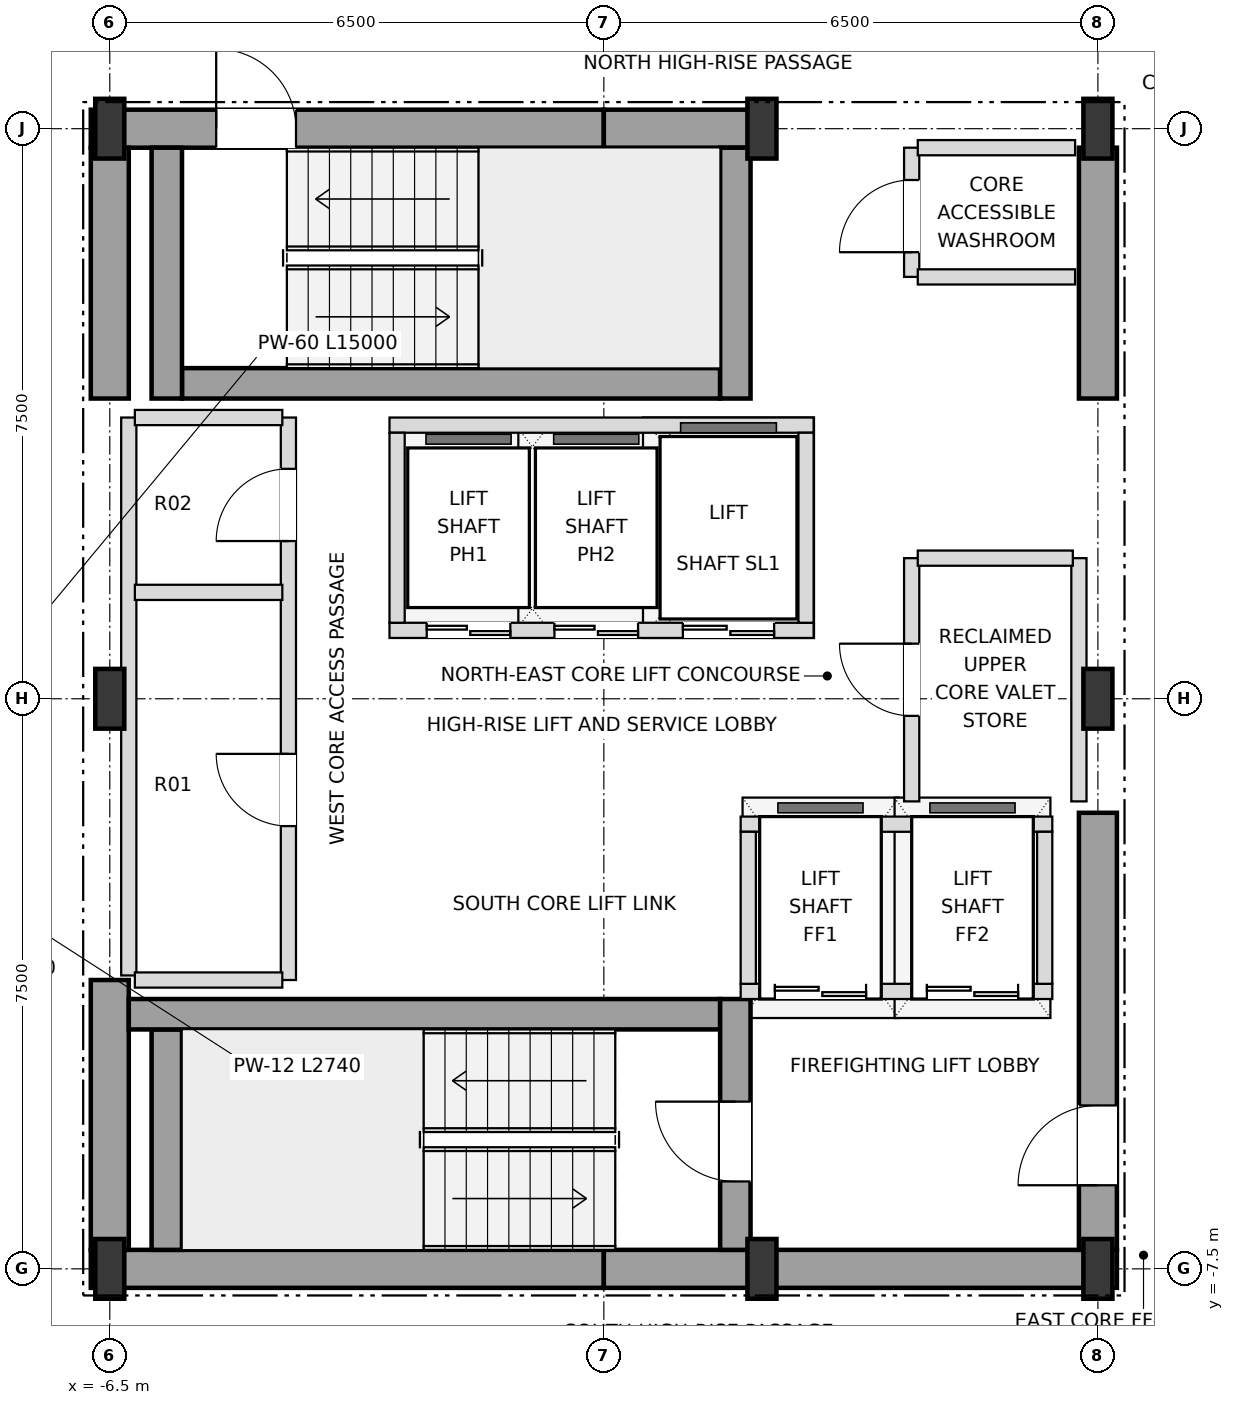
"""IFC4 building model, lengths in metres.
Left out: names, types, materials, properties, quantities, classifications, styles, units other than length and angle.
Written with IfcOpenShell. Run it as: python <this file> out.ifc"""

import sys

from ifc_helpers import new_model, si_unit, direction, frame, frame_2d, origin, origin_2d, place, context, subcontext, project, spatial, rectangle, i_section, extrude, element, fill, save


model = new_model("IFC4")
c1 = context("Model", 3, precision=1e-05, world=origin(), true_north=direction((0.0, 1.0)))
c2 = subcontext(c1, "Body", "Model", "MODEL_VIEW")
j1 = project(units=[si_unit("LENGTHUNIT", "METRE"), si_unit("PLANEANGLEUNIT", "RADIAN")], contexts=[c1])
p1 = place(None, origin())
s1 = spatial("IfcSite", under=j1, at=p1, CompositionType="ELEMENT")
p2 = place(p1, origin())
s2 = spatial("IfcBuilding", under=s1, at=p2, CompositionType="ELEMENT")
p3 = place(p2, frame((0.0, 0.0, 294.3)))
s3 = spatial("IfcBuildingStorey", under=s2, at=p3, CompositionType="ELEMENT", Elevation=294.3)
for number, where, z_axis, x_axis in (
    (1, (-6.5, -7.5, 0.0), (0.0, 0.0, 1.0), (1.0, 0.0, 0.0)),
    (2, (2.08, -7.5, 0.0), (0.0, 0.0, 1.0), (1.0, 0.0, 0.0)),
    (3, (6.5, -7.5, 0.0), (0.0, 0.0, 1.0), (1.0, 0.0, 0.0)),
    (4, (-6.5, 0.0, 0.0), (0.0, 0.0, 1.0), (1.0, 0.0, 0.0)),
    (5, (6.5, 0.0, 0.0), (0.0, 0.0, 1.0), (1.0, 0.0, 0.0)),
    (6, (-6.5, 7.5, 0.0), (0.0, 0.0, 1.0), (1.0, 0.0, 0.0)),
    (7, (2.08, 7.5, 0.0), (0.0, 0.0, 1.0), (1.0, 0.0, 0.0)),
    (8, (6.5, 7.5, 0.0), (0.0, 0.0, 1.0), (1.0, 0.0, 0.0)),
):
    element("IfcColumn", number, at=place(p3, frame(where, z_axis=z_axis, x_axis=x_axis)), inside=s3, PredefinedType="COLUMN", context=c2, shape_type="SweptSolid", body=[
        extrude(i_section(OverallWidth=0.382, OverallDepth=0.786, WebThickness=0.02, FlangeThickness=0.033, at=origin_2d()), origin(), (0.0, 0.0, 1.0), 3.6),
    ])
for number, where, z_axis, x_axis in (
    (9, (-6.75, -7.5, 0.0), (0.0, 0.0, 1.0), (1.0, 0.0, 0.0)),
    (10, (0.0, -7.5, 0.0), (0.0, 0.0, 1.0), (1.0, 0.0, 0.0)),
):
    element("IfcWall", number, at=place(p3, frame(where, z_axis=z_axis, x_axis=x_axis)), inside=s3, PredefinedType="SHEAR", context=c2, shape_type="SweptSolid", body=[
        extrude(rectangle(XDim=6.75, YDim=0.5, at=frame_2d((3.375, 0.0))), origin(), (0.0, 0.0, 1.0), 3.38),
    ])
p4 = place(p3, frame((-6.75, 7.5, 0.0), z_axis=(0.0, 0.0, 1.0), x_axis=(1.0, 0.0, 0.0)))
e11 = element("IfcWall", 11, at=p4, inside=s3, PredefinedType="SHEAR", context=c2, shape_type="SweptSolid", body=[
    extrude(rectangle(XDim=6.75, YDim=0.5, at=frame_2d((3.375, 0.0))), origin(), (0.0, 0.0, 1.0), 3.38),
])
p5 = place(p4, frame((1.65, 0.0, 0.0)))
e12 = element("IfcOpeningElement", 12, at=p5, cuts=e11, PredefinedType="OPENING", context=c2, shape_type="SweptSolid", body=[
    extrude(rectangle(XDim=1.05, YDim=2.15, at=frame_2d((0.525, 1.075))), frame((0.0, 0.26, 0.0), z_axis=(0.0, -1.0, 0.0), x_axis=(1.0, 0.0, 0.0)), (0.0, 0.0, 1.0), 0.52),
])
p6 = place(p3, frame((0.0, 7.5, 0.0), z_axis=(0.0, 0.0, 1.0), x_axis=(1.0, 0.0, 0.0)))
e13 = element("IfcWall", 13, at=p6, inside=s3, PredefinedType="SHEAR", context=c2, shape_type="SweptSolid", body=[
    extrude(rectangle(XDim=2.08, YDim=0.5, at=frame_2d((1.04, 0.0))), origin(), (0.0, 0.0, 1.0), 3.38),
])
p7 = place(p3, frame((-6.5, -7.25, 0.0), z_axis=(0.0, 0.0, 1.0), x_axis=(0.0, 1.0, 0.0)))
e14 = element("IfcWall", 14, at=p7, inside=s3, PredefinedType="SHEAR", context=c2, shape_type="SweptSolid", body=[
    extrude(rectangle(XDim=3.55, YDim=0.5, at=frame_2d((1.775, 0.0))), origin(), (0.0, 0.0, 1.0), 3.38),
])
p8 = place(p3, frame((-6.5, 3.95, 0.0), z_axis=(0.0, 0.0, 1.0), x_axis=(0.0, 1.0, 0.0)))
e15 = element("IfcWall", 15, at=p8, inside=s3, PredefinedType="SHEAR", context=c2, shape_type="SweptSolid", body=[
    extrude(rectangle(XDim=3.3, YDim=0.5, at=frame_2d((1.65, 0.0))), origin(), (0.0, 0.0, 1.0), 3.38),
])
p9 = place(p3, frame((6.5, -7.25, 0.0), z_axis=(0.0, 0.0, 1.0), x_axis=(0.0, 1.0, 0.0)))
e16 = element("IfcWall", 16, at=p9, inside=s3, PredefinedType="SHEAR", context=c2, shape_type="SweptSolid", body=[
    extrude(rectangle(XDim=5.75, YDim=0.5, at=frame_2d((2.875, 0.0))), origin(), (0.0, 0.0, 1.0), 3.38),
])
p10 = place(p9, frame((0.85, 0.0, 0.0)))
e17 = element("IfcOpeningElement", 17, at=p10, cuts=e16, PredefinedType="OPENING", context=c2, shape_type="SweptSolid", body=[
    extrude(rectangle(XDim=1.05, YDim=2.15, at=frame_2d((0.525, 1.075))), frame((0.0, 0.26, 0.0), z_axis=(0.0, -1.0, 0.0), x_axis=(1.0, 0.0, 0.0)), (0.0, 0.0, 1.0), 0.52),
])
p11 = place(p3, frame((6.5, 3.95, 0.0), z_axis=(0.0, 0.0, 1.0), x_axis=(0.0, 1.0, 0.0)))
e18 = element("IfcWall", 18, at=p11, inside=s3, PredefinedType="SHEAR", context=c2, shape_type="SweptSolid", body=[
    extrude(rectangle(XDim=3.3, YDim=0.5, at=frame_2d((1.65, 0.0))), origin(), (0.0, 0.0, 1.0), 3.38),
])
p12 = place(p3, frame((-5.75, -7.25, 0.0), z_axis=(0.0, 0.0, 1.0), x_axis=(0.0, 1.0, 0.0)))
e19 = element("IfcWall", 19, at=p12, inside=s3, PredefinedType="SHEAR", context=c2, shape_type="SweptSolid", body=[
    extrude(rectangle(XDim=2.9, YDim=0.4, at=frame_2d((1.45, 0.0))), origin(), (0.0, 0.0, 1.0), 3.38),
])
p13 = place(p3, frame((-6.25, -4.15, 0.0), z_axis=(0.0, 0.0, 1.0), x_axis=(1.0, 0.0, 0.0)))
e20 = element("IfcWall", 20, at=p13, inside=s3, PredefinedType="SHEAR", context=c2, shape_type="SweptSolid", body=[
    extrude(rectangle(XDim=7.78, YDim=0.4, at=frame_2d((3.89, 0.0))), origin(), (0.0, 0.0, 1.0), 3.38),
])
p14 = place(p3, frame((1.73, -7.25, 0.0), z_axis=(0.0, 0.0, 1.0), x_axis=(0.0, 1.0, 0.0)))
e21 = element("IfcWall", 21, at=p14, inside=s3, PredefinedType="SHEAR", context=c2, shape_type="SweptSolid", body=[
    extrude(rectangle(XDim=3.3, YDim=0.4, at=frame_2d((1.65, 0.0))), origin(), (0.0, 0.0, 1.0), 3.38),
])
p15 = place(p14, frame((0.9, 0.0, 0.0)))
e22 = element("IfcOpeningElement", 22, at=p15, cuts=e21, PredefinedType="OPENING", context=c2, shape_type="SweptSolid", body=[
    extrude(rectangle(XDim=1.05, YDim=2.15, at=frame_2d((0.525, 1.075))), frame((0.0, 0.21, 0.0), z_axis=(0.0, -1.0, 0.0), x_axis=(1.0, 0.0, 0.0)), (0.0, 0.0, 1.0), 0.42),
])
p16 = place(p3, frame((-5.55, 4.15, 0.0), z_axis=(0.0, 0.0, 1.0), x_axis=(1.0, 0.0, 0.0)))
e23 = element("IfcWall", 23, at=p16, inside=s3, PredefinedType="SHEAR", context=c2, shape_type="SweptSolid", body=[
    extrude(rectangle(XDim=7.08, YDim=0.4, at=frame_2d((3.54, 0.0))), origin(), (0.0, 0.0, 1.0), 3.38),
])
for number, where, z_axis, x_axis in (
    (24, (1.73, 3.95, 0.0), (0.0, 0.0, 1.0), (0.0, 1.0, 0.0)),
    (25, (-5.75, 3.95, 0.0), (0.0, 0.0, 1.0), (0.0, 1.0, 0.0)),
):
    element("IfcWall", number, at=place(p3, frame(where, z_axis=z_axis, x_axis=x_axis)), inside=s3, PredefinedType="SHEAR", context=c2, shape_type="SweptSolid", body=[
        extrude(rectangle(XDim=3.3, YDim=0.4, at=frame_2d((1.65, 0.0))), origin(), (0.0, 0.0, 1.0), 3.38),
    ])
p17 = place(p3, frame((-2.82, 0.9, 0.0), z_axis=(0.0, 0.0, 1.0), x_axis=(1.0, 0.0, 0.0)))
e26 = element("IfcWall", 26, at=p17, inside=s3, PredefinedType="SOLIDWALL", context=c2, shape_type="SweptSolid", body=[
    extrude(rectangle(XDim=5.58, YDim=0.2, at=frame_2d((2.79, 0.0))), origin(), (0.0, 0.0, 1.0), 3.38),
])
p18 = place(p17, frame((0.49, 0.0, 0.0)))
e27 = element("IfcOpeningElement", 27, at=p18, cuts=e26, PredefinedType="OPENING", context=c2, shape_type="SweptSolid", body=[
    extrude(rectangle(XDim=1.1, YDim=2.15, at=frame_2d((0.55, 1.075))), frame((0.0, 0.11, 0.0), z_axis=(0.0, -1.0, 0.0), x_axis=(1.0, 0.0, 0.0)), (0.0, 0.0, 1.0), 0.22),
])
p19 = place(p17, frame((2.17, 0.0, 0.0)))
e28 = element("IfcOpeningElement", 28, at=p19, cuts=e26, PredefinedType="OPENING", context=c2, shape_type="SweptSolid", body=[
    extrude(rectangle(XDim=1.1, YDim=2.15, at=frame_2d((0.55, 1.075))), frame((0.0, 0.11, 0.0), z_axis=(0.0, -1.0, 0.0), x_axis=(1.0, 0.0, 0.0)), (0.0, 0.0, 1.0), 0.22),
])
p20 = place(p17, frame((3.86, 0.0, 0.0)))
e29 = element("IfcOpeningElement", 29, at=p20, cuts=e26, PredefinedType="OPENING", context=c2, shape_type="SweptSolid", body=[
    extrude(rectangle(XDim=1.2, YDim=2.2, at=frame_2d((0.6, 1.1))), frame((0.0, 0.11, 0.0), z_axis=(0.0, -1.0, 0.0), x_axis=(1.0, 0.0, 0.0)), (0.0, 0.0, 1.0), 0.22),
])
p21 = place(p3, frame((-2.82, 3.6, 0.0), z_axis=(0.0, 0.0, 1.0), x_axis=(1.0, 0.0, 0.0)))
e30 = element("IfcWall", 30, at=p21, inside=s3, PredefinedType="SOLIDWALL", context=c2, shape_type="SweptSolid", body=[
    extrude(rectangle(XDim=5.58, YDim=0.2, at=frame_2d((2.79, 0.0))), origin(), (0.0, 0.0, 1.0), 3.38),
])
for number, where, z_axis, x_axis in (
    (31, (-2.72, 1.0, 0.0), (0.0, 0.0, 1.0), (0.0, 1.0, 0.0)),
    (32, (2.66, 1.0, 0.0), (0.0, 0.0, 1.0), (0.0, 1.0, 0.0)),
):
    element("IfcWall", number, at=place(p3, frame(where, z_axis=z_axis, x_axis=x_axis)), inside=s3, PredefinedType="SOLIDWALL", context=c2, shape_type="SweptSolid", body=[
        extrude(rectangle(XDim=2.5, YDim=0.2, at=frame_2d((1.25, 0.0))), origin(), (0.0, 0.0, 1.0), 3.38),
    ])
p22 = place(p3, frame((1.8, -3.85, 0.0), z_axis=(0.0, 0.0, 1.0), x_axis=(1.0, 0.0, 0.0)))
e33 = element("IfcWall", 33, at=p22, inside=s3, PredefinedType="SOLIDWALL", context=c2, shape_type="SweptSolid", body=[
    extrude(rectangle(XDim=4.1, YDim=0.2, at=frame_2d((2.05, 0.0))), origin(), (0.0, 0.0, 1.0), 3.38),
])
p23 = place(p22, frame((0.45, 0.0, 0.0)))
e34 = element("IfcOpeningElement", 34, at=p23, cuts=e33, PredefinedType="OPENING", context=c2, shape_type="SweptSolid", body=[
    extrude(rectangle(XDim=1.2, YDim=2.2, at=frame_2d((0.6, 1.1))), frame((0.0, 0.11, 0.0), z_axis=(0.0, -1.0, 0.0), x_axis=(1.0, 0.0, 0.0)), (0.0, 0.0, 1.0), 0.22),
])
p24 = place(p22, frame((2.45, 0.0, 0.0)))
e35 = element("IfcOpeningElement", 35, at=p24, cuts=e33, PredefinedType="OPENING", context=c2, shape_type="SweptSolid", body=[
    extrude(rectangle(XDim=1.2, YDim=2.2, at=frame_2d((0.6, 1.1))), frame((0.0, 0.11, 0.0), z_axis=(0.0, -1.0, 0.0), x_axis=(1.0, 0.0, 0.0)), (0.0, 0.0, 1.0), 0.22),
])
p25 = place(p3, frame((1.8, -1.65, 0.0), z_axis=(0.0, 0.0, 1.0), x_axis=(1.0, 0.0, 0.0)))
e36 = element("IfcWall", 36, at=p25, inside=s3, PredefinedType="SOLIDWALL", context=c2, shape_type="SweptSolid", body=[
    extrude(rectangle(XDim=4.1, YDim=0.2, at=frame_2d((2.05, 0.0))), origin(), (0.0, 0.0, 1.0), 3.38),
])
for number, where, z_axis, x_axis in (
    (37, (1.9, -3.75, 0.0), (0.0, 0.0, 1.0), (0.0, 1.0, 0.0)),
    (38, (5.8, -3.75, 0.0), (0.0, 0.0, 1.0), (0.0, 1.0, 0.0)),
):
    element("IfcWall", number, at=place(p3, frame(where, z_axis=z_axis, x_axis=x_axis)), inside=s3, PredefinedType="SOLIDWALL", context=c2, shape_type="SweptSolid", body=[
        extrude(rectangle(XDim=2.0, YDim=0.2, at=frame_2d((1.0, 0.0))), origin(), (0.0, 0.0, 1.0), 3.38),
    ])
p26 = place(p3, frame((-6.25, -3.64, 0.0), z_axis=(0.0, 0.0, 1.0), x_axis=(0.0, 1.0, 0.0)))
e39 = element("IfcWall", 39, at=p26, inside=s3, PredefinedType="SOLIDWALL", context=c2, shape_type="SweptSolid", body=[
    extrude(rectangle(XDim=7.34, YDim=0.2, at=frame_2d((3.67, 0.0))), origin(), (0.0, 0.0, 1.0), 3.38),
])
p27 = place(p3, frame((-4.15, -3.7, 0.0), z_axis=(0.0, 0.0, 1.0), x_axis=(0.0, 1.0, 0.0)))
e40 = element("IfcWall", 40, at=p27, inside=s3, PredefinedType="SOLIDWALL", context=c2, shape_type="SweptSolid", body=[
    extrude(rectangle(XDim=7.4, YDim=0.2, at=frame_2d((3.7, 0.0))), origin(), (0.0, 0.0, 1.0), 3.38),
])
p28 = place(p27, frame((2.025, 0.0, 0.0)))
e41 = element("IfcOpeningElement", 41, at=p28, cuts=e40, PredefinedType="OPENING", context=c2, shape_type="SweptSolid", body=[
    extrude(rectangle(XDim=0.95, YDim=2.15, at=frame_2d((0.475, 1.075))), frame((0.0, 0.11, 0.0), z_axis=(0.0, -1.0, 0.0), x_axis=(1.0, 0.0, 0.0)), (0.0, 0.0, 1.0), 0.22),
])
p29 = place(p27, frame((5.775, 0.0, 0.0)))
e42 = element("IfcOpeningElement", 42, at=p29, cuts=e40, PredefinedType="OPENING", context=c2, shape_type="SweptSolid", body=[
    extrude(rectangle(XDim=0.95, YDim=2.15, at=frame_2d((0.475, 1.075))), frame((0.0, 0.11, 0.0), z_axis=(0.0, -1.0, 0.0), x_axis=(1.0, 0.0, 0.0)), (0.0, 0.0, 1.0), 0.22),
])
p30 = place(p3, frame((4.05, -1.35, 0.0), z_axis=(0.0, 0.0, 1.0), x_axis=(0.0, 1.0, 0.0)))
e43 = element("IfcWall", 43, at=p30, inside=s3, PredefinedType="SOLIDWALL", context=c2, shape_type="SweptSolid", body=[
    extrude(rectangle(XDim=3.2, YDim=0.2, at=frame_2d((1.6, 0.0))), origin(), (0.0, 0.0, 1.0), 3.38),
])
p31 = place(p30, frame((1.125, 0.0, 0.0)))
e44 = element("IfcOpeningElement", 44, at=p31, cuts=e43, PredefinedType="OPENING", context=c2, shape_type="SweptSolid", body=[
    extrude(rectangle(XDim=0.95, YDim=2.15, at=frame_2d((0.475, 1.075))), frame((0.0, 0.11, 0.0), z_axis=(0.0, -1.0, 0.0), x_axis=(1.0, 0.0, 0.0)), (0.0, 0.0, 1.0), 0.22),
])
p32 = place(p3, frame((4.05, 5.55, 0.0), z_axis=(0.0, 0.0, 1.0), x_axis=(0.0, 1.0, 0.0)))
e45 = element("IfcWall", 45, at=p32, inside=s3, PredefinedType="SOLIDWALL", context=c2, shape_type="SweptSolid", body=[
    extrude(rectangle(XDim=1.7, YDim=0.2, at=frame_2d((0.85, 0.0))), origin(), (0.0, 0.0, 1.0), 3.38),
])
p33 = place(p32, frame((0.325, 0.0, 0.0)))
e46 = element("IfcOpeningElement", 46, at=p33, cuts=e45, PredefinedType="OPENING", context=c2, shape_type="SweptSolid", body=[
    extrude(rectangle(XDim=0.95, YDim=2.15, at=frame_2d((0.475, 1.075))), frame((0.0, 0.11, 0.0), z_axis=(0.0, -1.0, 0.0), x_axis=(1.0, 0.0, 0.0)), (0.0, 0.0, 1.0), 0.22),
])
p34 = place(p3, frame((6.25, -1.35, 0.0), z_axis=(0.0, 0.0, 1.0), x_axis=(0.0, 1.0, 0.0)))
e47 = element("IfcWall", 47, at=p34, inside=s3, PredefinedType="SOLIDWALL", context=c2, shape_type="SweptSolid", body=[
    extrude(rectangle(XDim=3.2, YDim=0.2, at=frame_2d((1.6, 0.0))), origin(), (0.0, 0.0, 1.0), 3.38),
])
for number, where, z_axis, x_axis in (
    (48, (-6.17, -3.7, 0.0), (0.0, 0.0, 1.0), (1.0, 0.0, 0.0)),
    (49, (-6.17, 1.4, 0.0), (0.0, 0.0, 1.0), (1.0, 0.0, 0.0)),
):
    element("IfcWall", number, at=place(p3, frame(where, z_axis=z_axis, x_axis=x_axis)), inside=s3, PredefinedType="SOLIDWALL", context=c2, shape_type="SweptSolid", body=[
        extrude(rectangle(XDim=1.94, YDim=0.2, at=frame_2d((0.97, 0.0))), origin(), (0.0, 0.0, 1.0), 3.38),
    ])
p35 = place(p3, frame((4.13, 1.85, 0.0), z_axis=(0.0, 0.0, 1.0), x_axis=(1.0, 0.0, 0.0)))
e50 = element("IfcWall", 50, at=p35, inside=s3, PredefinedType="SOLIDWALL", context=c2, shape_type="SweptSolid", body=[
    extrude(rectangle(XDim=2.04, YDim=0.2, at=frame_2d((1.02, 0.0))), origin(), (0.0, 0.0, 1.0), 3.38),
])
p36 = place(p3, frame((-6.17, 3.7, 0.0), z_axis=(0.0, 0.0, 1.0), x_axis=(1.0, 0.0, 0.0)))
e51 = element("IfcWall", 51, at=p36, inside=s3, PredefinedType="SOLIDWALL", context=c2, shape_type="SweptSolid", body=[
    extrude(rectangle(XDim=1.94, YDim=0.2, at=frame_2d((0.97, 0.0))), origin(), (0.0, 0.0, 1.0), 3.38),
])
for number, where, z_axis, x_axis in (
    (52, (4.13, 5.55, 0.0), (0.0, 0.0, 1.0), (1.0, 0.0, 0.0)),
    (53, (4.13, 7.25, 0.0), (0.0, 0.0, 1.0), (1.0, 0.0, 0.0)),
):
    element("IfcWall", number, at=place(p3, frame(where, z_axis=z_axis, x_axis=x_axis)), inside=s3, PredefinedType="SOLIDWALL", context=c2, shape_type="SweptSolid", body=[
        extrude(rectangle(XDim=2.07, YDim=0.2, at=frame_2d((1.035, 0.0))), origin(), (0.0, 0.0, 1.0), 3.38),
    ])
p37 = place(p10, origin())
e54 = element("IfcDoor", 54, at=p37, inside=s3, OperationType="SINGLE_SWING_LEFT", PredefinedType="DOOR", context=c2, shape_type="SweptSolid", body=[
    extrude(rectangle(XDim=1.05, YDim=2.15, at=frame_2d((0.525, 1.075))), frame((0.0, 0.025, 0.0), z_axis=(0.0, -1.0, 0.0), x_axis=(1.0, 0.0, 0.0)), (0.0, 0.0, 1.0), 0.05),
])
fill(e17, e54)
p38 = place(p15, origin())
e55 = element("IfcDoor", 55, at=p38, inside=s3, OperationType="SINGLE_SWING_RIGHT", PredefinedType="DOOR", context=c2, shape_type="SweptSolid", body=[
    extrude(rectangle(XDim=1.05, YDim=2.15, at=frame_2d((0.525, 1.075))), frame((0.0, 0.025, 0.0), z_axis=(0.0, -1.0, 0.0), x_axis=(1.0, 0.0, 0.0)), (0.0, 0.0, 1.0), 0.05),
])
fill(e22, e55)
p39 = place(p5, origin())
e56 = element("IfcDoor", 56, at=p39, inside=s3, OperationType="SINGLE_SWING_LEFT", PredefinedType="DOOR", context=c2, shape_type="SweptSolid", body=[
    extrude(rectangle(XDim=1.05, YDim=2.15, at=frame_2d((0.525, 1.075))), frame((0.0, 0.025, 0.0), z_axis=(0.0, -1.0, 0.0), x_axis=(1.0, 0.0, 0.0)), (0.0, 0.0, 1.0), 0.05),
])
fill(e12, e56)
p40 = place(p18, origin())
e57 = element("IfcDoor", 57, at=p40, inside=s3, OperationType="DOUBLE_DOOR_SLIDING", PredefinedType="DOOR", context=c2, shape_type="SweptSolid", body=[
    extrude(rectangle(XDim=1.1, YDim=2.15, at=frame_2d((0.55, 1.075))), frame((0.0, 0.025, 0.0), z_axis=(0.0, -1.0, 0.0), x_axis=(1.0, 0.0, 0.0)), (0.0, 0.0, 1.0), 0.05),
])
fill(e27, e57)
p41 = place(p19, origin())
e58 = element("IfcDoor", 58, at=p41, inside=s3, OperationType="DOUBLE_DOOR_SLIDING", PredefinedType="DOOR", context=c2, shape_type="SweptSolid", body=[
    extrude(rectangle(XDim=1.1, YDim=2.15, at=frame_2d((0.55, 1.075))), frame((0.0, 0.025, 0.0), z_axis=(0.0, -1.0, 0.0), x_axis=(1.0, 0.0, 0.0)), (0.0, 0.0, 1.0), 0.05),
])
fill(e28, e58)
p42 = place(p20, origin())
e59 = element("IfcDoor", 59, at=p42, inside=s3, OperationType="DOUBLE_DOOR_SLIDING", PredefinedType="DOOR", context=c2, shape_type="SweptSolid", body=[
    extrude(rectangle(XDim=1.2, YDim=2.2, at=frame_2d((0.6, 1.1))), frame((0.0, 0.025, 0.0), z_axis=(0.0, -1.0, 0.0), x_axis=(1.0, 0.0, 0.0)), (0.0, 0.0, 1.0), 0.05),
])
fill(e29, e59)
p43 = place(p23, origin())
e60 = element("IfcDoor", 60, at=p43, inside=s3, OperationType="DOUBLE_DOOR_SLIDING", PredefinedType="DOOR", context=c2, shape_type="SweptSolid", body=[
    extrude(rectangle(XDim=1.2, YDim=2.2, at=frame_2d((0.6, 1.1))), frame((0.0, 0.025, 0.0), z_axis=(0.0, -1.0, 0.0), x_axis=(1.0, 0.0, 0.0)), (0.0, 0.0, 1.0), 0.05),
])
fill(e34, e60)
p44 = place(p24, origin())
e61 = element("IfcDoor", 61, at=p44, inside=s3, OperationType="DOUBLE_DOOR_SLIDING", PredefinedType="DOOR", context=c2, shape_type="SweptSolid", body=[
    extrude(rectangle(XDim=1.2, YDim=2.2, at=frame_2d((0.6, 1.1))), frame((0.0, 0.025, 0.0), z_axis=(0.0, -1.0, 0.0), x_axis=(1.0, 0.0, 0.0)), (0.0, 0.0, 1.0), 0.05),
])
fill(e35, e61)
p45 = place(p28, origin())
e62 = element("IfcDoor", 62, at=p45, inside=s3, OperationType="SINGLE_SWING_RIGHT", PredefinedType="DOOR", context=c2, shape_type="SweptSolid", body=[
    extrude(rectangle(XDim=0.95, YDim=2.15, at=frame_2d((0.475, 1.075))), frame((0.0, 0.025, 0.0), z_axis=(0.0, -1.0, 0.0), x_axis=(1.0, 0.0, 0.0)), (0.0, 0.0, 1.0), 0.05),
])
fill(e41, e62)
p46 = place(p29, origin())
e63 = element("IfcDoor", 63, at=p46, inside=s3, OperationType="SINGLE_SWING_LEFT", PredefinedType="DOOR", context=c2, shape_type="SweptSolid", body=[
    extrude(rectangle(XDim=0.95, YDim=2.15, at=frame_2d((0.475, 1.075))), frame((0.0, 0.025, 0.0), z_axis=(0.0, -1.0, 0.0), x_axis=(1.0, 0.0, 0.0)), (0.0, 0.0, 1.0), 0.05),
])
fill(e42, e63)
p47 = place(p31, origin())
e64 = element("IfcDoor", 64, at=p47, inside=s3, OperationType="SINGLE_SWING_RIGHT", PredefinedType="DOOR", context=c2, shape_type="SweptSolid", body=[
    extrude(rectangle(XDim=0.95, YDim=2.15, at=frame_2d((0.475, 1.075))), frame((0.0, 0.025, 0.0), z_axis=(0.0, -1.0, 0.0), x_axis=(1.0, 0.0, 0.0)), (0.0, 0.0, 1.0), 0.05),
])
fill(e44, e64)
p48 = place(p33, origin())
e65 = element("IfcDoor", 65, at=p48, inside=s3, OperationType="SINGLE_SWING_LEFT", PredefinedType="DOOR", context=c2, shape_type="SweptSolid", body=[
    extrude(rectangle(XDim=0.95, YDim=2.15, at=frame_2d((0.475, 1.075))), frame((0.0, 0.025, 0.0), z_axis=(0.0, -1.0, 0.0), x_axis=(1.0, 0.0, 0.0)), (0.0, 0.0, 1.0), 0.05),
])
fill(e46, e65)
save(model, sys.argv[1])
